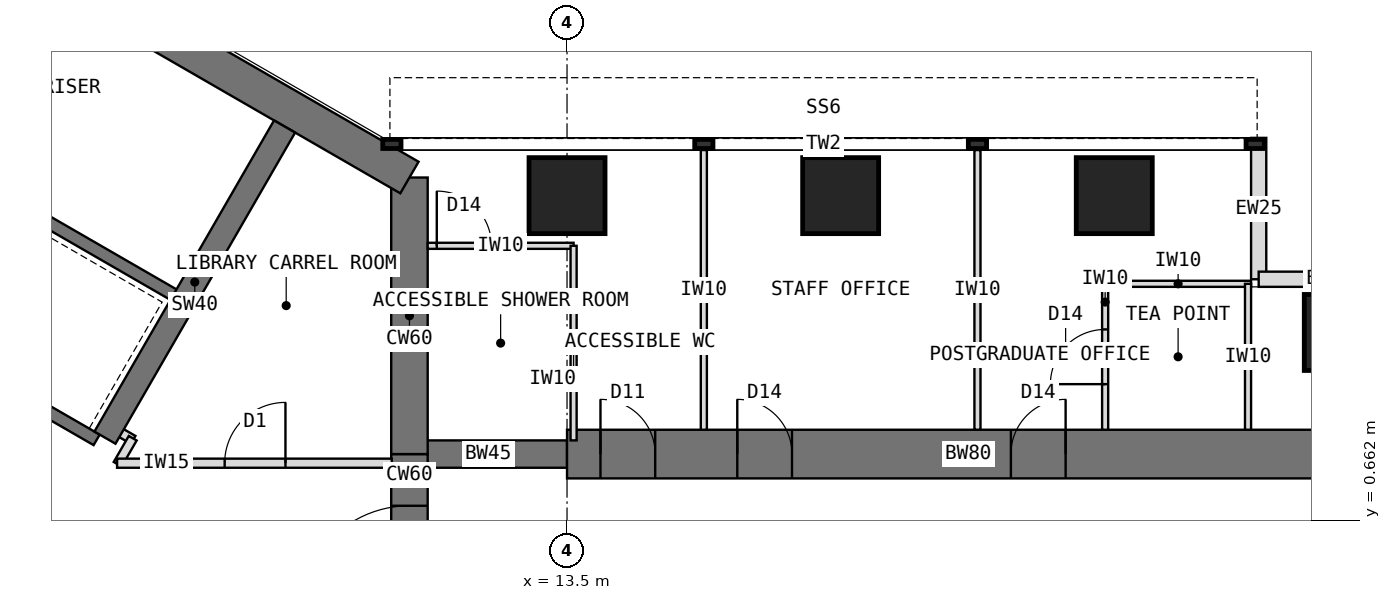
"""IFC4 building model, lengths in metres.
Left out: names, types, materials, properties, quantities, classifications, styles, units other than length and angle.
Written with IfcOpenShell. Run it as: python <this file> out.ifc"""

import sys

from ifc_helpers import new_model, si_unit, direction, frame, frame_2d, origin, origin_2d, place, context, subcontext, project, spatial, rectangle, extrude, element, fill, save


model = new_model("IFC4")
c1 = context("Model", 3, precision=1e-05, world=origin(), true_north=direction((0.0, 1.0)))
c2 = subcontext(c1, "Body", "Model", "MODEL_VIEW")
j1 = project(units=[si_unit("LENGTHUNIT", "METRE"), si_unit("PLANEANGLEUNIT", "RADIAN")], contexts=[c1])
p1 = place(None, origin())
s1 = spatial("IfcSite", under=j1, at=p1, CompositionType="ELEMENT")
p2 = place(p1, origin())
s2 = spatial("IfcBuilding", under=s1, at=p2, CompositionType="ELEMENT")
p3 = place(p2, frame((0.0, 0.0, 145.5)))
s3 = spatial("IfcBuildingStorey", under=s2, at=p3, CompositionType="ELEMENT", Elevation=145.5)
p4 = place(p3, frame((10.908, -1.75, 0.0), z_axis=(0.0, 0.0, 1.0), x_axis=(0.0, 1.0, 0.0)))
e1 = element("IfcWall", 1, at=p4, inside=s3, PredefinedType="SHEAR", context=c2, shape_type="SweptSolid", body=[
    extrude(rectangle(XDim=3.5, YDim=0.6, at=frame_2d((1.75, 0.0))), origin(), (0.0, 0.0, 1.0), 4.0),
])
p5 = place(p4, frame((0.85, 0.0, 0.0)))
e2 = element("IfcOpeningElement", 2, at=p5, cuts=e1, PredefinedType="OPENING", context=c2, shape_type="SweptSolid", body=[
    extrude(rectangle(XDim=1.8, YDim=2.1, at=frame_2d((0.9, 1.05))), frame((0.0, 0.31, 0.0), z_axis=(0.0, -1.0, 0.0), x_axis=(1.0, 0.0, 0.0)), (0.0, 0.0, 1.0), 0.62),
])
p6 = place(p3, frame((10.908, 1.75, 0.0), z_axis=(0.0, 0.0, 1.0), x_axis=(0.0, 1.0, 0.0)))
e3 = element("IfcWall", 3, at=p6, inside=s3, PredefinedType="SHEAR", context=c2, shape_type="SweptSolid", body=[
    extrude(rectangle(XDim=4.548, YDim=0.6, at=frame_2d((2.274, 0.0))), origin(), (0.0, 0.0, 1.0), 4.0),
])
p7 = place(p3, frame((10.908, 6.298, 0.0), z_axis=(0.0, 0.0, 1.0), x_axis=(-0.866021940709, 0.500005998175, 0.0)))
e4 = element("IfcWall", 4, at=p7, inside=s3, PredefinedType="SHEAR", context=c2, shape_type="SweptSolid", body=[
    extrude(rectangle(XDim=12.596, YDim=0.6, at=frame_2d((6.298, 0.0))), origin(), (0.0, 0.0, 1.0), 4.0),
])
p8 = place(p3, frame((10.908, 1.75, 0.0), z_axis=(0.0, 0.0, 1.0), x_axis=(1.0, 0.0, 0.0)))
e5 = element("IfcWall", 5, at=p8, inside=s3, PredefinedType="SHEAR", context=c2, shape_type="SweptSolid", body=[
    extrude(rectangle(XDim=2.592, YDim=0.45, at=frame_2d((1.296, 0.0))), origin(), (0.0, 0.0, 1.0), 4.0),
])
p9 = place(p3, frame((13.5, 1.75, 0.0), z_axis=(0.0, 0.0, 1.0), x_axis=(1.0, 0.0, 0.0)))
e6 = element("IfcWall", 6, at=p9, inside=s3, PredefinedType="SHEAR", context=c2, shape_type="SweptSolid", body=[
    extrude(rectangle(XDim=13.2, YDim=0.8, at=frame_2d((6.6, 0.0))), origin(), (0.0, 0.0, 1.0), 4.0),
])
p10 = place(p9, frame((0.55, 0.0, 0.0)))
e7 = element("IfcOpeningElement", 7, at=p10, cuts=e6, PredefinedType="OPENING", context=c2, shape_type="SweptSolid", body=[
    extrude(rectangle(XDim=0.9, YDim=2.1, at=frame_2d((0.45, 1.05))), frame((0.0, 0.41, 0.0), z_axis=(0.0, -1.0, 0.0), x_axis=(1.0, 0.0, 0.0)), (0.0, 0.0, 1.0), 0.82),
])
p11 = place(p9, frame((2.8, 0.0, 0.0)))
e8 = element("IfcOpeningElement", 8, at=p11, cuts=e6, PredefinedType="OPENING", context=c2, shape_type="SweptSolid", body=[
    extrude(rectangle(XDim=0.9, YDim=2.1, at=frame_2d((0.45, 1.05))), frame((0.0, 0.41, 0.0), z_axis=(0.0, -1.0, 0.0), x_axis=(1.0, 0.0, 0.0)), (0.0, 0.0, 1.0), 0.82),
])
p12 = place(p9, frame((7.3, 0.0, 0.0)))
e9 = element("IfcOpeningElement", 9, at=p12, cuts=e6, PredefinedType="OPENING", context=c2, shape_type="SweptSolid", body=[
    extrude(rectangle(XDim=0.9, YDim=2.1, at=frame_2d((0.45, 1.05))), frame((0.0, 0.41, 0.0), z_axis=(0.0, -1.0, 0.0), x_axis=(1.0, 0.0, 0.0)), (0.0, 0.0, 1.0), 0.82),
])
for number, where, z_axis, x_axis in (
    (10, (13.5, 6.0, 0.0), (0.0, 0.0, 1.0), (1.0, 0.0, 0.0)),
    (11, (18.0, 6.0, 0.0), (0.0, 0.0, 1.0), (1.0, 0.0, 0.0)),
    (12, (22.5, 6.0, 0.0), (0.0, 0.0, 1.0), (1.0, 0.0, 0.0)),
    (13, (26.25, 3.75, 0.0), (0.0, 0.0, 1.0), (1.0, 0.0, 0.0)),
):
    element("IfcColumn", number, at=place(p3, frame(where, z_axis=z_axis, x_axis=x_axis)), inside=s3, PredefinedType="COLUMN", context=c2, shape_type="SweptSolid", body=[
        extrude(rectangle(XDim=1.25, YDim=1.25, at=origin_2d()), origin(), (0.0, 0.0, 1.0), 4.0),
    ])
for number, where, z_axis, x_axis in (
    (14, (24.875, 6.95, 0.0), (0.0, 0.0, 1.0), (0.0, -1.0, 0.0)),
    (15, (24.875, 4.625, 0.0), (0.0, 0.0, 1.0), (1.0, 0.0, 0.0)),
):
    element("IfcWall", number, at=place(p3, frame(where, z_axis=z_axis, x_axis=x_axis)), inside=s3, PredefinedType="STANDARD", context=c2, shape_type="SweptSolid", body=[
        extrude(rectangle(XDim=2.325, YDim=0.25, at=frame_2d((1.163, 0.0))), origin(), (0.0, 0.0, 1.0), 3.8),
    ])
p13 = place(p3, frame((5.764, 1.984, 0.0), z_axis=(0.0, 0.0, 1.0), x_axis=(-0.866026010844, 0.49999894854, 0.0)))
e16 = element("IfcWall", 16, at=p13, inside=s3, PredefinedType="SHEAR", context=c2, shape_type="SweptSolid", body=[
    extrude(rectangle(XDim=8.0, YDim=0.2, at=frame_2d((4.0, 0.0))), origin(), (0.0, 0.0, 1.0), 4.0),
])
p14 = place(p13, frame((6.3, 0.0, 0.0)))
e17 = element("IfcOpeningElement", 17, at=p14, cuts=e16, PredefinedType="OPENING", context=c2, shape_type="SweptSolid", body=[
    extrude(rectangle(XDim=1.2, YDim=2.1, at=frame_2d((0.6, 1.05))), frame((0.0, 0.11, 0.0), z_axis=(0.0, -1.0, 0.0), x_axis=(1.0, 0.0, 0.0)), (0.0, 0.0, 1.0), 0.22),
])
p15 = place(p3, frame((7.114, 4.322, 0.0), z_axis=(0.0, 0.0, 1.0), x_axis=(-0.866026010844, 0.49999894854, 0.0)))
e18 = element("IfcWall", 18, at=p15, inside=s3, PredefinedType="SHEAR", context=c2, shape_type="SweptSolid", body=[
    extrude(rectangle(XDim=8.0, YDim=0.2, at=frame_2d((4.0, 0.0))), origin(), (0.0, 0.0, 1.0), 4.0),
])
p16 = place(p15, frame((6.8, 0.0, 0.0)))
e19 = element("IfcOpeningElement", 19, at=p16, cuts=e18, PredefinedType="OPENING", context=c2, shape_type="SweptSolid", body=[
    extrude(rectangle(XDim=0.9, YDim=2.1, at=frame_2d((0.45, 1.05))), frame((0.0, 0.11, 0.0), z_axis=(0.0, -1.0, 0.0), x_axis=(1.0, 0.0, 0.0)), (0.0, 0.0, 1.0), 0.22),
])
p17 = place(p3, frame((5.901, 2.02, 0.0), z_axis=(0.0, 0.0, 1.0), x_axis=(0.500027676417, 0.866009424208, 0.0)))
e20 = element("IfcWall", 20, at=p17, inside=s3, PredefinedType="SHEAR", context=c2, shape_type="SweptSolid", body=[
    extrude(rectangle(XDim=5.908, YDim=0.4, at=frame_2d((2.954, 0.0))), origin(), (0.0, 0.0, 1.0), 4.0),
])
for number, where, z_axis, x_axis in (
    (21, (15.75, 2.15, 0.0), (0.0, 0.0, 1.0), (0.0, 1.0, 0.0)),
    (22, (20.25, 2.15, 0.0), (0.0, 0.0, 1.0), (0.0, 1.0, 0.0)),
):
    element("IfcWall", number, at=place(p3, frame(where, z_axis=z_axis, x_axis=x_axis)), inside=s3, PredefinedType="PARTITIONING", context=c2, shape_type="SweptSolid", body=[
        extrude(rectangle(XDim=4.6, YDim=0.1, at=frame_2d((2.3, 0.0))), origin(), (0.0, 0.0, 1.0), 3.8),
    ])
p18 = place(p3, frame((22.35, 4.55, 0.0), z_axis=(0.0, 0.0, 1.0), x_axis=(1.0, 0.0, 0.0)))
e23 = element("IfcWall", 23, at=p18, inside=s3, PredefinedType="PARTITIONING", context=c2, shape_type="SweptSolid", body=[
    extrude(rectangle(XDim=2.4, YDim=0.1, at=frame_2d((1.2, 0.0))), origin(), (0.0, 0.0, 1.0), 3.8),
])
p19 = place(p3, frame((22.35, 2.15, 0.0), z_axis=(0.0, 0.0, 1.0), x_axis=(0.0, 1.0, 0.0)))
e24 = element("IfcWall", 24, at=p19, inside=s3, PredefinedType="PARTITIONING", context=c2, shape_type="SweptSolid", body=[
    extrude(rectangle(XDim=2.4, YDim=0.1, at=frame_2d((1.2, 0.0))), origin(), (0.0, 0.0, 1.0), 3.8),
])
p20 = place(p19, frame((0.75, 0.0, 0.0)))
e25 = element("IfcOpeningElement", 25, at=p20, cuts=e24, PredefinedType="OPENING", context=c2, shape_type="SweptSolid", body=[
    extrude(rectangle(XDim=0.9, YDim=2.1, at=frame_2d((0.45, 1.05))), frame((0.0, 0.06, 0.0), z_axis=(0.0, -1.0, 0.0), x_axis=(1.0, 0.0, 0.0)), (0.0, 0.0, 1.0), 0.12),
])
p21 = place(p3, frame((24.7, 2.15, 0.0), z_axis=(0.0, 0.0, 1.0), x_axis=(0.0, 1.0, 0.0)))
e26 = element("IfcWall", 26, at=p21, inside=s3, PredefinedType="PARTITIONING", context=c2, shape_type="SweptSolid", body=[
    extrude(rectangle(XDim=2.4, YDim=0.1, at=frame_2d((1.2, 0.0))), origin(), (0.0, 0.0, 1.0), 3.8),
])
p22 = place(p3, frame((11.208, 5.175, 0.0), z_axis=(0.0, 0.0, 1.0), x_axis=(1.0, 0.0, 0.0)))
e27 = element("IfcWall", 27, at=p22, inside=s3, PredefinedType="PARTITIONING", context=c2, shape_type="SweptSolid", body=[
    extrude(rectangle(XDim=2.4, YDim=0.1, at=frame_2d((1.2, 0.0))), origin(), (0.0, 0.0, 1.0), 3.8),
])
p23 = place(p22, frame((0.15, 0.0, 0.0)))
e28 = element("IfcOpeningElement", 28, at=p23, cuts=e27, PredefinedType="OPENING", context=c2, shape_type="SweptSolid", body=[
    extrude(rectangle(XDim=0.9, YDim=2.1, at=frame_2d((0.45, 1.05))), frame((0.0, 0.06, 0.0), z_axis=(0.0, -1.0, 0.0), x_axis=(1.0, 0.0, 0.0)), (0.0, 0.0, 1.0), 0.12),
])
p24 = place(p3, frame((13.608, 1.975, 0.0), z_axis=(0.0, 0.0, 1.0), x_axis=(0.0, 1.0, 0.0)))
e29 = element("IfcWall", 29, at=p24, inside=s3, PredefinedType="PARTITIONING", context=c2, shape_type="SweptSolid", body=[
    extrude(rectangle(XDim=3.2, YDim=0.1, at=frame_2d((1.6, 0.0))), origin(), (0.0, 0.0, 1.0), 3.8),
])
p25 = place(p3, frame((5.992, 2.198, 0.0), z_axis=(0.0, 0.0, 1.0), x_axis=(0.865892400268, -0.500230298122, 0.0)))
e30 = element("IfcWall", 30, at=p25, inside=s3, PredefinedType="PARTITIONING", context=c2, shape_type="SweptSolid", body=[
    extrude(rectangle(XDim=0.43, YDim=0.15, at=frame_2d((0.215, 0.0))), origin(), (0.0, 0.0, 1.0), 3.8),
])
p26 = place(p3, frame((6.357, 2.011, 0.0), z_axis=(0.0, 0.0, 1.0), x_axis=(-0.50033519877, -0.865831790172, 0.0)))
e31 = element("IfcWall", 31, at=p26, inside=s3, PredefinedType="PARTITIONING", context=c2, shape_type="SweptSolid", body=[
    extrude(rectangle(XDim=0.494, YDim=0.15, at=frame_2d((0.247, 0.0))), origin(), (0.0, 0.0, 1.0), 3.8),
])
p27 = place(p3, frame((6.1, 1.6, 0.0), z_axis=(0.0, 0.0, 1.0), x_axis=(1.0, 0.0, 0.0)))
e32 = element("IfcWall", 32, at=p27, inside=s3, PredefinedType="PARTITIONING", context=c2, shape_type="SweptSolid", body=[
    extrude(rectangle(XDim=4.519, YDim=0.15, at=frame_2d((2.259, 0.0))), origin(), (0.0, 0.0, 1.0), 3.8),
])
p28 = place(p27, frame((1.769, 0.0, 0.0)))
e33 = element("IfcOpeningElement", 33, at=p28, cuts=e32, PredefinedType="OPENING", context=c2, shape_type="SweptSolid", body=[
    extrude(rectangle(XDim=1.0, YDim=2.1, at=frame_2d((0.5, 1.05))), frame((0.0, 0.085, 0.0), z_axis=(0.0, -1.0, 0.0), x_axis=(1.0, 0.0, 0.0)), (0.0, 0.0, 1.0), 0.17),
])
p29 = place(p5, origin())
e34 = element("IfcDoor", 34, at=p29, inside=s3, OperationType="DOUBLE_DOOR_DOUBLE_SWING", PredefinedType="DOOR", context=c2, shape_type="SweptSolid", body=[
    extrude(rectangle(XDim=1.72, YDim=2.06, at=frame_2d((0.9, 1.03))), frame((0.0, 0.025, 0.0), z_axis=(0.0, -1.0, 0.0), x_axis=(1.0, 0.0, 0.0)), (0.0, 0.0, 1.0), 0.05),
    extrude(rectangle(XDim=0.04, YDim=2.1, at=frame_2d((0.02, 1.05))), frame((0.0, 0.3, 0.0), z_axis=(0.0, -1.0, 0.0), x_axis=(1.0, 0.0, 0.0)), (0.0, 0.0, 1.0), 0.6),
    extrude(rectangle(XDim=0.04, YDim=2.1, at=frame_2d((1.78, 1.05))), frame((0.0, 0.3, 0.0), z_axis=(0.0, -1.0, 0.0), x_axis=(1.0, 0.0, 0.0)), (0.0, 0.0, 1.0), 0.6),
    extrude(rectangle(XDim=1.72, YDim=0.04, at=frame_2d((0.9, 2.08))), frame((0.0, 0.3, 0.0), z_axis=(0.0, -1.0, 0.0), x_axis=(1.0, 0.0, 0.0)), (0.0, 0.0, 1.0), 0.6),
])
fill(e2, e34)
p30 = place(p20, origin())
e35 = element("IfcDoor", 35, at=p30, inside=s3, OperationType="SINGLE_SWING_LEFT", PredefinedType="DOOR", context=c2, shape_type="SweptSolid", body=[
    extrude(rectangle(XDim=0.9, YDim=2.1, at=frame_2d((0.45, 1.05))), frame((0.0, 0.025, 0.0), z_axis=(0.0, -1.0, 0.0), x_axis=(1.0, 0.0, 0.0)), (0.0, 0.0, 1.0), 0.05),
])
fill(e25, e35)
p31 = place(p23, origin())
e36 = element("IfcDoor", 36, at=p31, inside=s3, OperationType="SINGLE_SWING_LEFT", PredefinedType="DOOR", context=c2, shape_type="SweptSolid", body=[
    extrude(rectangle(XDim=0.9, YDim=2.1, at=frame_2d((0.45, 1.05))), frame((0.0, 0.025, 0.0), z_axis=(0.0, -1.0, 0.0), x_axis=(1.0, 0.0, 0.0)), (0.0, 0.0, 1.0), 0.05),
])
fill(e28, e36)
p32 = place(p28, origin())
e37 = element("IfcDoor", 37, at=p32, inside=s3, OperationType="SINGLE_SWING_RIGHT", PredefinedType="DOOR", context=c2, shape_type="SweptSolid", body=[
    extrude(rectangle(XDim=1.0, YDim=2.1, at=frame_2d((0.5, 1.05))), frame((0.0, 0.025, 0.0), z_axis=(0.0, -1.0, 0.0), x_axis=(1.0, 0.0, 0.0)), (0.0, 0.0, 1.0), 0.05),
])
fill(e33, e37)
p33 = place(p10, origin())
e38 = element("IfcDoor", 38, at=p33, inside=s3, OperationType="SINGLE_SWING_LEFT", PredefinedType="DOOR", context=c2, shape_type="SweptSolid", body=[
    extrude(rectangle(XDim=0.82, YDim=2.06, at=frame_2d((0.45, 1.03))), frame((0.0, 0.025, 0.0), z_axis=(0.0, -1.0, 0.0), x_axis=(1.0, 0.0, 0.0)), (0.0, 0.0, 1.0), 0.05),
    extrude(rectangle(XDim=0.04, YDim=2.1, at=frame_2d((0.02, 1.05))), frame((0.0, 0.4, 0.0), z_axis=(0.0, -1.0, 0.0), x_axis=(1.0, 0.0, 0.0)), (0.0, 0.0, 1.0), 0.8),
    extrude(rectangle(XDim=0.04, YDim=2.1, at=frame_2d((0.88, 1.05))), frame((0.0, 0.4, 0.0), z_axis=(0.0, -1.0, 0.0), x_axis=(1.0, 0.0, 0.0)), (0.0, 0.0, 1.0), 0.8),
    extrude(rectangle(XDim=0.82, YDim=0.04, at=frame_2d((0.45, 2.08))), frame((0.0, 0.4, 0.0), z_axis=(0.0, -1.0, 0.0), x_axis=(1.0, 0.0, 0.0)), (0.0, 0.0, 1.0), 0.8),
])
fill(e7, e38)
p34 = place(p11, origin())
e39 = element("IfcDoor", 39, at=p34, inside=s3, OperationType="SINGLE_SWING_LEFT", PredefinedType="DOOR", context=c2, shape_type="SweptSolid", body=[
    extrude(rectangle(XDim=0.82, YDim=2.06, at=frame_2d((0.45, 1.03))), frame((0.0, 0.025, 0.0), z_axis=(0.0, -1.0, 0.0), x_axis=(1.0, 0.0, 0.0)), (0.0, 0.0, 1.0), 0.05),
    extrude(rectangle(XDim=0.04, YDim=2.1, at=frame_2d((0.02, 1.05))), frame((0.0, 0.4, 0.0), z_axis=(0.0, -1.0, 0.0), x_axis=(1.0, 0.0, 0.0)), (0.0, 0.0, 1.0), 0.8),
    extrude(rectangle(XDim=0.04, YDim=2.1, at=frame_2d((0.88, 1.05))), frame((0.0, 0.4, 0.0), z_axis=(0.0, -1.0, 0.0), x_axis=(1.0, 0.0, 0.0)), (0.0, 0.0, 1.0), 0.8),
    extrude(rectangle(XDim=0.82, YDim=0.04, at=frame_2d((0.45, 2.08))), frame((0.0, 0.4, 0.0), z_axis=(0.0, -1.0, 0.0), x_axis=(1.0, 0.0, 0.0)), (0.0, 0.0, 1.0), 0.8),
])
fill(e8, e39)
p35 = place(p12, origin())
e40 = element("IfcDoor", 40, at=p35, inside=s3, OperationType="SINGLE_SWING_RIGHT", PredefinedType="DOOR", context=c2, shape_type="SweptSolid", body=[
    extrude(rectangle(XDim=0.82, YDim=2.06, at=frame_2d((0.45, 1.03))), frame((0.0, 0.025, 0.0), z_axis=(0.0, -1.0, 0.0), x_axis=(1.0, 0.0, 0.0)), (0.0, 0.0, 1.0), 0.05),
    extrude(rectangle(XDim=0.04, YDim=2.1, at=frame_2d((0.02, 1.05))), frame((0.0, 0.4, 0.0), z_axis=(0.0, -1.0, 0.0), x_axis=(1.0, 0.0, 0.0)), (0.0, 0.0, 1.0), 0.8),
    extrude(rectangle(XDim=0.04, YDim=2.1, at=frame_2d((0.88, 1.05))), frame((0.0, 0.4, 0.0), z_axis=(0.0, -1.0, 0.0), x_axis=(1.0, 0.0, 0.0)), (0.0, 0.0, 1.0), 0.8),
    extrude(rectangle(XDim=0.82, YDim=0.04, at=frame_2d((0.45, 2.08))), frame((0.0, 0.4, 0.0), z_axis=(0.0, -1.0, 0.0), x_axis=(1.0, 0.0, 0.0)), (0.0, 0.0, 1.0), 0.8),
])
fill(e9, e40)
save(model, sys.argv[1])
